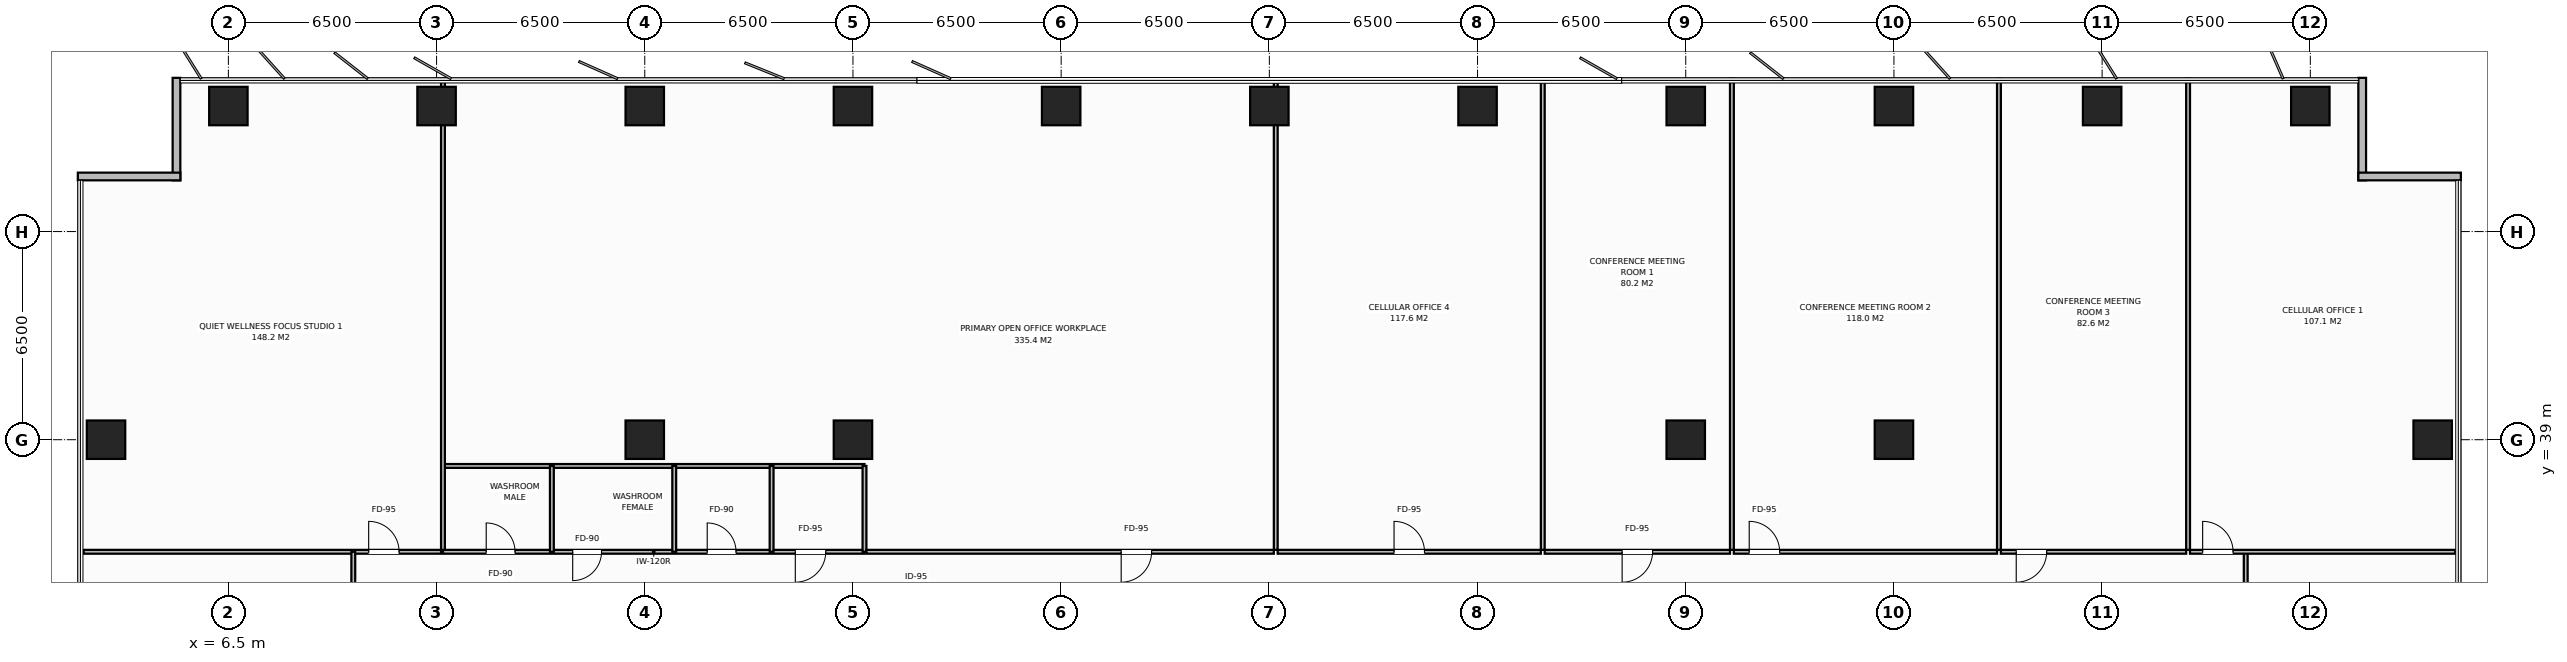
"""IFC4 building model, lengths in metres.
Left out: names, types, materials, properties, quantities, classifications, styles, units other than length and angle.
Written with IfcOpenShell. Run it as: python <this file> out.ifc"""

import sys

from ifc_helpers import new_model, si_unit, direction, frame, frame_2d, origin, origin_2d, place, context, subcontext, project, spatial, rectangle, extrude, element, fill, save


model = new_model("IFC4")
c1 = context("Model", 3, precision=1e-05, world=origin(), true_north=direction((0.0, 1.0)))
c2 = subcontext(c1, "Body", "Model", "MODEL_VIEW")
j1 = project(units=[si_unit("LENGTHUNIT", "METRE"), si_unit("PLANEANGLEUNIT", "RADIAN")], contexts=[c1])
p1 = place(None, origin())
s1 = spatial("IfcSite", under=j1, at=p1, CompositionType="ELEMENT")
p2 = place(p1, origin())
s2 = spatial("IfcBuilding", under=s1, at=p2, CompositionType="ELEMENT")
p3 = place(p2, frame((0.0, 0.0, 112.6)))
s3 = spatial("IfcBuildingStorey", under=s2, at=p3, CompositionType="ELEMENT", Elevation=112.6)
for number, where, z_axis, x_axis in (
    (1, (19.5, 39.0, 0.0), (0.0, 0.0, 1.0), (1.0, 0.0, 0.0)),
    (2, (58.5, 39.0, 0.0), (0.0, 0.0, 1.0), (1.0, 0.0, 0.0)),
    (3, (26.0, 39.0, 0.0), (0.0, 0.0, 1.0), (1.0, 0.0, 0.0)),
    (4, (52.0, 39.0, 0.0), (0.0, 0.0, 1.0), (1.0, 0.0, 0.0)),
    (5, (6.5, 49.42, 0.0), (0.0, 0.0, 1.0), (1.0, 0.0, 0.0)),
    (6, (13.0, 49.42, 0.0), (0.0, 0.0, 1.0), (1.0, 0.0, 0.0)),
    (7, (19.5, 49.42, 0.0), (0.0, 0.0, 1.0), (1.0, 0.0, 0.0)),
    (8, (26.0, 49.42, 0.0), (0.0, 0.0, 1.0), (1.0, 0.0, 0.0)),
    (9, (32.5, 49.42, 0.0), (0.0, 0.0, 1.0), (1.0, 0.0, 0.0)),
    (10, (39.0, 49.42, 0.0), (0.0, 0.0, 1.0), (1.0, 0.0, 0.0)),
    (11, (45.5, 49.42, 0.0), (0.0, 0.0, 1.0), (1.0, 0.0, 0.0)),
    (12, (52.0, 49.42, 0.0), (0.0, 0.0, 1.0), (1.0, 0.0, 0.0)),
    (13, (58.5, 49.42, 0.0), (0.0, 0.0, 1.0), (1.0, 0.0, 0.0)),
    (14, (65.0, 49.42, 0.0), (0.0, 0.0, 1.0), (1.0, 0.0, 0.0)),
    (15, (71.5, 49.42, 0.0), (0.0, 0.0, 1.0), (1.0, 0.0, 0.0)),
    (16, (2.68, 39.0, 0.0), (0.0, 0.0, 1.0), (1.0, 0.0, 0.0)),
    (17, (75.32, 39.0, 0.0), (0.0, 0.0, 1.0), (1.0, 0.0, 0.0)),
):
    element("IfcColumn", number, at=place(p3, frame(where, z_axis=z_axis, x_axis=x_axis)), inside=s3, PredefinedType="COLUMN", context=c2, shape_type="SweptSolid", body=[
        extrude(rectangle(XDim=1.2, YDim=1.2, at=origin_2d()), origin(), (0.0, 0.0, 1.0), 3.8),
    ])
for number, where, z_axis, x_axis in (
    (18, (4.88, 47.1, 0.0), (0.0, 0.0, 1.0), (0.0, 1.0, 0.0)),
    (19, (1.8, 47.22, 0.0), (0.0, 0.0, 1.0), (1.0, 0.0, 0.0)),
    (20, (73.12, 50.3, 0.0), (0.0, 0.0, 1.0), (0.0, -1.0, 0.0)),
    (21, (73.0, 47.22, 0.0), (0.0, 0.0, 1.0), (1.0, 0.0, 0.0)),
):
    element("IfcWall", number, at=place(p3, frame(where, z_axis=z_axis, x_axis=x_axis)), inside=s3, PredefinedType="STANDARD", context=c2, shape_type="SweptSolid", body=[
        extrude(rectangle(XDim=3.2, YDim=0.24, at=frame_2d((1.6, 0.0))), origin(), (0.0, 0.0, 1.0), 3.565),
    ])
p4 = place(p3, frame((69.483, 33.4, 0.0), z_axis=(0.0, 0.0, 1.0), x_axis=(0.0, 1.0, 0.0)))
e22 = element("IfcWall", 22, at=p4, inside=s3, PredefinedType="PARTITIONING", context=c2, shape_type="SweptSolid", body=[
    extrude(rectangle(XDim=2.1, YDim=0.12, at=frame_2d((1.05, 0.0))), origin(), (0.0, 0.0, 1.0), 3.565),
])
p5 = place(p3, frame((13.2, 35.5, 0.0), z_axis=(0.0, 0.0, 1.0), x_axis=(1.0, 0.0, 0.0)))
e23 = element("IfcWall", 23, at=p5, inside=s3, PredefinedType="PARTITIONING", context=c2, shape_type="SweptSolid", body=[
    extrude(rectangle(XDim=13.16, YDim=0.12, at=frame_2d((6.58, 0.0))), origin(), (0.0, 0.0, 1.0), 3.565),
])
p6 = place(p5, frame((1.35, 0.0, 0.0)))
e24 = element("IfcOpeningElement", 24, at=p6, cuts=e23, PredefinedType="OPENING", context=c2, shape_type="SweptSolid", body=[
    extrude(rectangle(XDim=0.9, YDim=2.15, at=frame_2d((0.45, 1.075))), frame((0.0, 0.07, 0.0), z_axis=(0.0, -1.0, 0.0), x_axis=(1.0, 0.0, 0.0)), (0.0, 0.0, 1.0), 0.14),
])
p7 = place(p5, frame((4.05, 0.0, 0.0)))
e25 = element("IfcOpeningElement", 25, at=p7, cuts=e23, PredefinedType="OPENING", context=c2, shape_type="SweptSolid", body=[
    extrude(rectangle(XDim=0.9, YDim=2.15, at=frame_2d((0.45, 1.075))), frame((0.0, 0.07, 0.0), z_axis=(0.0, -1.0, 0.0), x_axis=(1.0, 0.0, 0.0)), (0.0, 0.0, 1.0), 0.14),
])
p8 = place(p5, frame((8.25, 0.0, 0.0)))
e26 = element("IfcOpeningElement", 26, at=p8, cuts=e23, PredefinedType="OPENING", context=c2, shape_type="SweptSolid", body=[
    extrude(rectangle(XDim=0.9, YDim=2.15, at=frame_2d((0.45, 1.075))), frame((0.0, 0.07, 0.0), z_axis=(0.0, -1.0, 0.0), x_axis=(1.0, 0.0, 0.0)), (0.0, 0.0, 1.0), 0.14),
])
p9 = place(p5, frame((11.0, 0.0, 0.0)))
e27 = element("IfcOpeningElement", 27, at=p9, cuts=e23, PredefinedType="OPENING", context=c2, shape_type="SweptSolid", body=[
    extrude(rectangle(XDim=0.95, YDim=2.15, at=frame_2d((0.475, 1.075))), frame((0.0, 0.07, 0.0), z_axis=(0.0, -1.0, 0.0), x_axis=(1.0, 0.0, 0.0)), (0.0, 0.0, 1.0), 0.14),
])
p10 = place(p3, frame((13.2, 38.18, 0.0), z_axis=(0.0, 0.0, 1.0), x_axis=(1.0, 0.0, 0.0)))
e28 = element("IfcWall", 28, at=p10, inside=s3, PredefinedType="PARTITIONING", context=c2, shape_type="SweptSolid", body=[
    extrude(rectangle(XDim=13.16, YDim=0.12, at=frame_2d((6.58, 0.0))), origin(), (0.0, 0.0, 1.0), 3.565),
])
for number, where, z_axis, x_axis in (
    (29, (16.6, 35.5, 0.0), (0.0, 0.0, 1.0), (0.0, 1.0, 0.0)),
    (30, (20.42, 35.5, 0.0), (0.0, 0.0, 1.0), (0.0, 1.0, 0.0)),
    (31, (23.46, 35.5, 0.0), (0.0, 0.0, 1.0), (0.0, 1.0, 0.0)),
    (32, (26.36, 35.5, 0.0), (0.0, 0.0, 1.0), (0.0, 1.0, 0.0)),
):
    element("IfcWall", number, at=place(p3, frame(where, z_axis=z_axis, x_axis=x_axis)), inside=s3, PredefinedType="PARTITIONING", context=c2, shape_type="SweptSolid", body=[
        extrude(rectangle(XDim=2.68, YDim=0.12, at=frame_2d((1.34, 0.0))), origin(), (0.0, 0.0, 1.0), 3.565),
    ])
p11 = place(p3, frame((13.2, 35.56, 0.0), z_axis=(0.0, 0.0, 1.0), x_axis=(0.0, 1.0, 0.0)))
e33 = element("IfcWall", 33, at=p11, inside=s3, PredefinedType="PARTITIONING", context=c2, shape_type="SweptSolid", body=[
    extrude(rectangle(XDim=14.72, YDim=0.12, at=frame_2d((7.36, 0.0))), origin(), (0.0, 0.0, 1.0), 2.965),
])
p12 = place(p3, frame((1.98, 35.5, 0.0), z_axis=(0.0, 0.0, 1.0), x_axis=(1.0, 0.0, 0.0)))
e34 = element("IfcWall", 34, at=p12, inside=s3, PredefinedType="PARTITIONING", context=c2, shape_type="SweptSolid", body=[
    extrude(rectangle(XDim=11.16, YDim=0.12, at=frame_2d((5.58, 0.0))), origin(), (0.0, 0.0, 1.0), 3.565),
])
p13 = place(p12, frame((8.9, 0.0, 0.0)))
e35 = element("IfcOpeningElement", 35, at=p13, cuts=e34, PredefinedType="OPENING", context=c2, shape_type="SweptSolid", body=[
    extrude(rectangle(XDim=0.95, YDim=2.15, at=frame_2d((0.475, 1.075))), frame((0.0, 0.07, 0.0), z_axis=(0.0, -1.0, 0.0), x_axis=(1.0, 0.0, 0.0)), (0.0, 0.0, 1.0), 0.14),
])
p14 = place(p3, frame((39.2, 35.56, 0.0), z_axis=(0.0, 0.0, 1.0), x_axis=(0.0, 1.0, 0.0)))
e36 = element("IfcWall", 36, at=p14, inside=s3, PredefinedType="PARTITIONING", context=c2, shape_type="SweptSolid", body=[
    extrude(rectangle(XDim=14.72, YDim=0.12, at=frame_2d((7.36, 0.0))), origin(), (0.0, 0.0, 1.0), 2.965),
])
p15 = place(p3, frame((26.42, 35.5, 0.0), z_axis=(0.0, 0.0, 1.0), x_axis=(1.0, 0.0, 0.0)))
e37 = element("IfcWall", 37, at=p15, inside=s3, PredefinedType="PARTITIONING", context=c2, shape_type="SweptSolid", body=[
    extrude(rectangle(XDim=12.72, YDim=0.12, at=frame_2d((6.36, 0.0))), origin(), (0.0, 0.0, 1.0), 3.565),
])
p16 = place(p15, frame((7.954, 0.0, 0.0)))
e38 = element("IfcOpeningElement", 38, at=p16, cuts=e37, PredefinedType="OPENING", context=c2, shape_type="SweptSolid", body=[
    extrude(rectangle(XDim=0.95, YDim=2.15, at=frame_2d((0.475, 1.075))), frame((0.0, 0.07, 0.0), z_axis=(0.0, -1.0, 0.0), x_axis=(1.0, 0.0, 0.0)), (0.0, 0.0, 1.0), 0.14),
])
p17 = place(p3, frame((47.537, 35.56, 0.0), z_axis=(0.0, 0.0, 1.0), x_axis=(0.0, 1.0, 0.0)))
e39 = element("IfcWall", 39, at=p17, inside=s3, PredefinedType="PARTITIONING", context=c2, shape_type="SweptSolid", body=[
    extrude(rectangle(XDim=14.72, YDim=0.12, at=frame_2d((7.36, 0.0))), origin(), (0.0, 0.0, 1.0), 3.565),
])
p18 = place(p3, frame((39.26, 35.5, 0.0), z_axis=(0.0, 0.0, 1.0), x_axis=(1.0, 0.0, 0.0)))
e40 = element("IfcWall", 40, at=p18, inside=s3, PredefinedType="PARTITIONING", context=c2, shape_type="SweptSolid", body=[
    extrude(rectangle(XDim=8.217, YDim=0.12, at=frame_2d((4.108, 0.0))), origin(), (0.0, 0.0, 1.0), 3.565),
])
p19 = place(p18, frame((3.633, 0.0, 0.0)))
e41 = element("IfcOpeningElement", 41, at=p19, cuts=e40, PredefinedType="OPENING", context=c2, shape_type="SweptSolid", body=[
    extrude(rectangle(XDim=0.95, YDim=2.15, at=frame_2d((0.475, 1.075))), frame((0.0, 0.07, 0.0), z_axis=(0.0, -1.0, 0.0), x_axis=(1.0, 0.0, 0.0)), (0.0, 0.0, 1.0), 0.14),
])
p20 = place(p3, frame((53.442, 35.56, 0.0), z_axis=(0.0, 0.0, 1.0), x_axis=(0.0, 1.0, 0.0)))
e42 = element("IfcWall", 42, at=p20, inside=s3, PredefinedType="PARTITIONING", context=c2, shape_type="SweptSolid", body=[
    extrude(rectangle(XDim=14.72, YDim=0.12, at=frame_2d((7.36, 0.0))), origin(), (0.0, 0.0, 1.0), 3.565),
])
p21 = place(p3, frame((47.597, 35.5, 0.0), z_axis=(0.0, 0.0, 1.0), x_axis=(1.0, 0.0, 0.0)))
e43 = element("IfcWall", 43, at=p21, inside=s3, PredefinedType="PARTITIONING", context=c2, shape_type="SweptSolid", body=[
    extrude(rectangle(XDim=5.785, YDim=0.12, at=frame_2d((2.893, 0.0))), origin(), (0.0, 0.0, 1.0), 3.565),
])
p22 = place(p21, frame((2.417, 0.0, 0.0)))
e44 = element("IfcOpeningElement", 44, at=p22, cuts=e43, PredefinedType="OPENING", context=c2, shape_type="SweptSolid", body=[
    extrude(rectangle(XDim=0.95, YDim=2.15, at=frame_2d((0.475, 1.075))), frame((0.0, 0.07, 0.0), z_axis=(0.0, -1.0, 0.0), x_axis=(1.0, 0.0, 0.0)), (0.0, 0.0, 1.0), 0.14),
])
p23 = place(p3, frame((61.778, 35.56, 0.0), z_axis=(0.0, 0.0, 1.0), x_axis=(0.0, 1.0, 0.0)))
e45 = element("IfcWall", 45, at=p23, inside=s3, PredefinedType="PARTITIONING", context=c2, shape_type="SweptSolid", body=[
    extrude(rectangle(XDim=14.72, YDim=0.12, at=frame_2d((7.36, 0.0))), origin(), (0.0, 0.0, 1.0), 3.565),
])
p24 = place(p3, frame((53.502, 35.5, 0.0), z_axis=(0.0, 0.0, 1.0), x_axis=(1.0, 0.0, 0.0)))
e46 = element("IfcWall", 46, at=p24, inside=s3, PredefinedType="PARTITIONING", context=c2, shape_type="SweptSolid", body=[
    extrude(rectangle(XDim=8.217, YDim=0.12, at=frame_2d((4.108, 0.0))), origin(), (0.0, 0.0, 1.0), 3.565),
])
p25 = place(p24, frame((0.48, 0.0, 0.0)))
e47 = element("IfcOpeningElement", 47, at=p25, cuts=e46, PredefinedType="OPENING", context=c2, shape_type="SweptSolid", body=[
    extrude(rectangle(XDim=0.95, YDim=2.15, at=frame_2d((0.475, 1.075))), frame((0.0, 0.07, 0.0), z_axis=(0.0, -1.0, 0.0), x_axis=(1.0, 0.0, 0.0)), (0.0, 0.0, 1.0), 0.14),
])
p26 = place(p3, frame((67.683, 35.56, 0.0), z_axis=(0.0, 0.0, 1.0), x_axis=(0.0, 1.0, 0.0)))
e48 = element("IfcWall", 48, at=p26, inside=s3, PredefinedType="PARTITIONING", context=c2, shape_type="SweptSolid", body=[
    extrude(rectangle(XDim=14.72, YDim=0.12, at=frame_2d((7.36, 0.0))), origin(), (0.0, 0.0, 1.0), 3.565),
])
p27 = place(p3, frame((61.838, 35.5, 0.0), z_axis=(0.0, 0.0, 1.0), x_axis=(1.0, 0.0, 0.0)))
e49 = element("IfcWall", 49, at=p27, inside=s3, PredefinedType="PARTITIONING", context=c2, shape_type="SweptSolid", body=[
    extrude(rectangle(XDim=5.785, YDim=0.12, at=frame_2d((2.893, 0.0))), origin(), (0.0, 0.0, 1.0), 3.565),
])
p28 = place(p27, frame((0.48, 0.0, 0.0)))
e50 = element("IfcOpeningElement", 50, at=p28, cuts=e49, PredefinedType="OPENING", context=c2, shape_type="SweptSolid", body=[
    extrude(rectangle(XDim=0.95, YDim=2.15, at=frame_2d((0.475, 1.075))), frame((0.0, 0.07, 0.0), z_axis=(0.0, -1.0, 0.0), x_axis=(1.0, 0.0, 0.0)), (0.0, 0.0, 1.0), 0.14),
])
p29 = place(p3, frame((67.743, 35.5, 0.0), z_axis=(0.0, 0.0, 1.0), x_axis=(1.0, 0.0, 0.0)))
e51 = element("IfcWall", 51, at=p29, inside=s3, PredefinedType="PARTITIONING", context=c2, shape_type="SweptSolid", body=[
    extrude(rectangle(XDim=8.277, YDim=0.12, at=frame_2d((4.138, 0.0))), origin(), (0.0, 0.0, 1.0), 3.565),
])
p30 = place(p29, frame((0.395, 0.0, 0.0)))
e52 = element("IfcOpeningElement", 52, at=p30, cuts=e51, PredefinedType="OPENING", context=c2, shape_type="SweptSolid", body=[
    extrude(rectangle(XDim=0.95, YDim=2.15, at=frame_2d((0.475, 1.075))), frame((0.0, 0.07, 0.0), z_axis=(0.0, -1.0, 0.0), x_axis=(1.0, 0.0, 0.0)), (0.0, 0.0, 1.0), 0.14),
])
p31 = place(p3, frame((10.4, 26.0, 0.0), z_axis=(0.0, 0.0, 1.0), x_axis=(0.0, 1.0, 0.0)))
e53 = element("IfcWall", 53, at=p31, inside=s3, PredefinedType="PARTITIONING", context=c2, shape_type="SweptSolid", body=[
    extrude(rectangle(XDim=9.5, YDim=0.12, at=frame_2d((4.75, 0.0))), origin(), (0.0, 0.0, 1.0), 3.565),
])
p32 = place(p31, frame((3.225, 0.0, 0.0)))
e54 = element("IfcOpeningElement", 54, at=p32, cuts=e53, PredefinedType="OPENING", context=c2, shape_type="SweptSolid", body=[
    extrude(rectangle(XDim=0.95, YDim=2.15, at=frame_2d((0.475, 1.075))), frame((0.0, 0.07, 0.0), z_axis=(0.0, -1.0, 0.0), x_axis=(1.0, 0.0, 0.0)), (0.0, 0.0, 1.0), 0.14),
])
p33 = place(p6, origin())
e55 = element("IfcDoor", 55, at=p33, inside=s3, OperationType="SINGLE_SWING_LEFT", PredefinedType="DOOR", context=c2, shape_type="SweptSolid", body=[
    extrude(rectangle(XDim=0.9, YDim=2.15, at=frame_2d((0.45, 1.075))), frame((0.0, 0.025, 0.0), z_axis=(0.0, -1.0, 0.0), x_axis=(1.0, 0.0, 0.0)), (0.0, 0.0, 1.0), 0.05),
])
fill(e24, e55)
p34 = place(p7, origin())
e56 = element("IfcDoor", 56, at=p34, inside=s3, OperationType="SINGLE_SWING_RIGHT", PredefinedType="DOOR", context=c2, shape_type="SweptSolid", body=[
    extrude(rectangle(XDim=0.9, YDim=2.15, at=frame_2d((0.45, 1.075))), frame((0.0, 0.025, 0.0), z_axis=(0.0, -1.0, 0.0), x_axis=(1.0, 0.0, 0.0)), (0.0, 0.0, 1.0), 0.05),
])
fill(e25, e56)
p35 = place(p8, origin())
e57 = element("IfcDoor", 57, at=p35, inside=s3, OperationType="SINGLE_SWING_LEFT", PredefinedType="DOOR", context=c2, shape_type="SweptSolid", body=[
    extrude(rectangle(XDim=0.9, YDim=2.15, at=frame_2d((0.45, 1.075))), frame((0.0, 0.025, 0.0), z_axis=(0.0, -1.0, 0.0), x_axis=(1.0, 0.0, 0.0)), (0.0, 0.0, 1.0), 0.05),
])
fill(e26, e57)
p36 = place(p9, origin())
e58 = element("IfcDoor", 58, at=p36, inside=s3, OperationType="SINGLE_SWING_RIGHT", PredefinedType="DOOR", context=c2, shape_type="SweptSolid", body=[
    extrude(rectangle(XDim=0.95, YDim=2.15, at=frame_2d((0.475, 1.075))), frame((0.0, 0.025, 0.0), z_axis=(0.0, -1.0, 0.0), x_axis=(1.0, 0.0, 0.0)), (0.0, 0.0, 1.0), 0.05),
])
fill(e27, e58)
p37 = place(p13, origin())
e59 = element("IfcDoor", 59, at=p37, inside=s3, OperationType="SINGLE_SWING_LEFT", PredefinedType="DOOR", context=c2, shape_type="SweptSolid", body=[
    extrude(rectangle(XDim=0.95, YDim=2.15, at=frame_2d((0.475, 1.075))), frame((0.0, 0.025, 0.0), z_axis=(0.0, -1.0, 0.0), x_axis=(1.0, 0.0, 0.0)), (0.0, 0.0, 1.0), 0.05),
])
fill(e35, e59)
p38 = place(p16, origin())
e60 = element("IfcDoor", 60, at=p38, inside=s3, OperationType="SINGLE_SWING_RIGHT", PredefinedType="DOOR", context=c2, shape_type="SweptSolid", body=[
    extrude(rectangle(XDim=0.95, YDim=2.15, at=frame_2d((0.475, 1.075))), frame((0.0, 0.025, 0.0), z_axis=(0.0, -1.0, 0.0), x_axis=(1.0, 0.0, 0.0)), (0.0, 0.0, 1.0), 0.05),
])
fill(e38, e60)
p39 = place(p19, origin())
e61 = element("IfcDoor", 61, at=p39, inside=s3, OperationType="SINGLE_SWING_LEFT", PredefinedType="DOOR", context=c2, shape_type="SweptSolid", body=[
    extrude(rectangle(XDim=0.95, YDim=2.15, at=frame_2d((0.475, 1.075))), frame((0.0, 0.025, 0.0), z_axis=(0.0, -1.0, 0.0), x_axis=(1.0, 0.0, 0.0)), (0.0, 0.0, 1.0), 0.05),
])
fill(e41, e61)
p40 = place(p22, origin())
e62 = element("IfcDoor", 62, at=p40, inside=s3, OperationType="SINGLE_SWING_RIGHT", PredefinedType="DOOR", context=c2, shape_type="SweptSolid", body=[
    extrude(rectangle(XDim=0.95, YDim=2.15, at=frame_2d((0.475, 1.075))), frame((0.0, 0.025, 0.0), z_axis=(0.0, -1.0, 0.0), x_axis=(1.0, 0.0, 0.0)), (0.0, 0.0, 1.0), 0.05),
])
fill(e44, e62)
p41 = place(p25, origin())
e63 = element("IfcDoor", 63, at=p41, inside=s3, OperationType="SINGLE_SWING_LEFT", PredefinedType="DOOR", context=c2, shape_type="SweptSolid", body=[
    extrude(rectangle(XDim=0.95, YDim=2.15, at=frame_2d((0.475, 1.075))), frame((0.0, 0.025, 0.0), z_axis=(0.0, -1.0, 0.0), x_axis=(1.0, 0.0, 0.0)), (0.0, 0.0, 1.0), 0.05),
])
fill(e47, e63)
p42 = place(p28, origin())
e64 = element("IfcDoor", 64, at=p42, inside=s3, OperationType="SINGLE_SWING_RIGHT", PredefinedType="DOOR", context=c2, shape_type="SweptSolid", body=[
    extrude(rectangle(XDim=0.95, YDim=2.15, at=frame_2d((0.475, 1.075))), frame((0.0, 0.025, 0.0), z_axis=(0.0, -1.0, 0.0), x_axis=(1.0, 0.0, 0.0)), (0.0, 0.0, 1.0), 0.05),
])
fill(e50, e64)
p43 = place(p30, origin())
e65 = element("IfcDoor", 65, at=p43, inside=s3, OperationType="SINGLE_SWING_LEFT", PredefinedType="DOOR", context=c2, shape_type="SweptSolid", body=[
    extrude(rectangle(XDim=0.95, YDim=2.15, at=frame_2d((0.475, 1.075))), frame((0.0, 0.025, 0.0), z_axis=(0.0, -1.0, 0.0), x_axis=(1.0, 0.0, 0.0)), (0.0, 0.0, 1.0), 0.05),
])
fill(e52, e65)
save(model, sys.argv[1])
